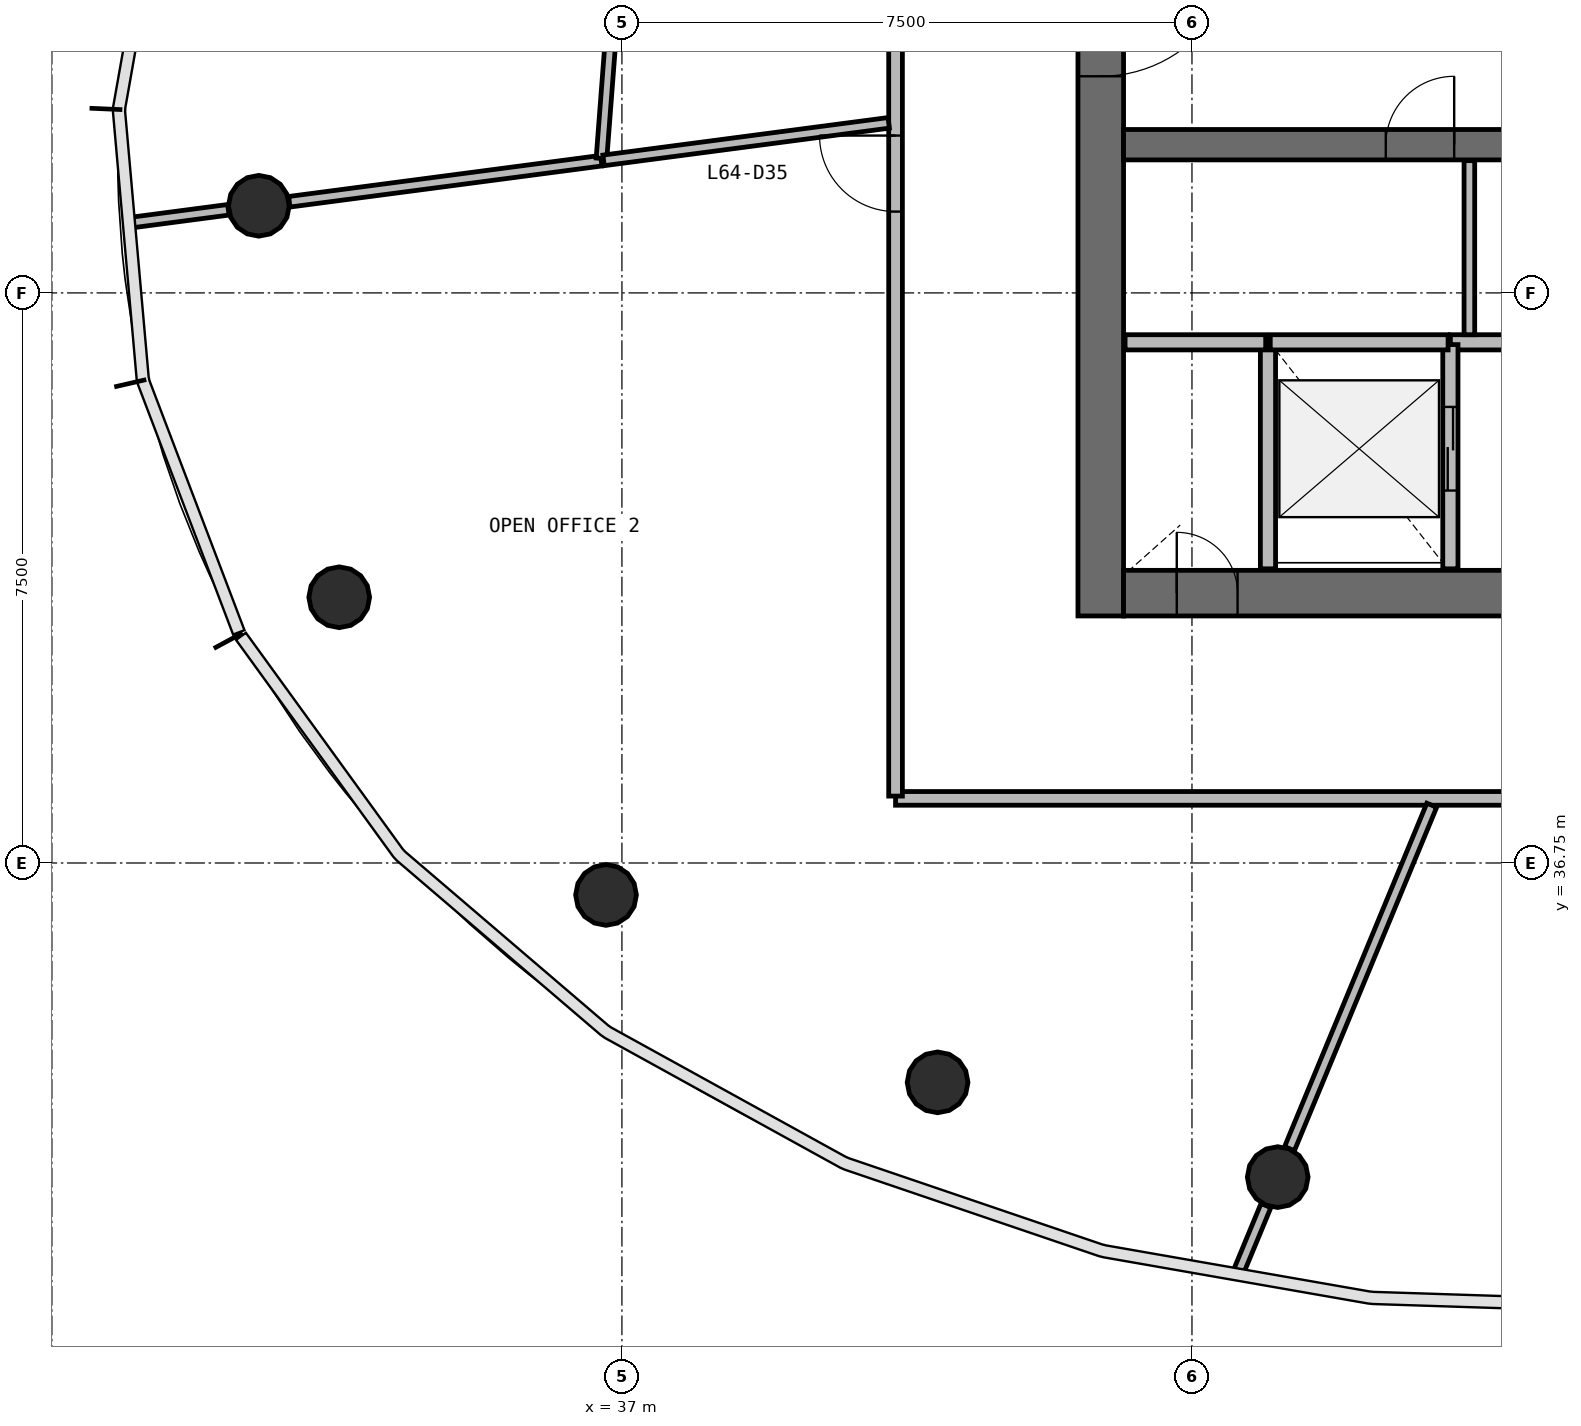
"""IFC4 building model, lengths in metres.
Left out: names, types, materials, properties, quantities, classifications, styles, units other than length and angle.
Written with IfcOpenShell. Run it as: python <this file> out.ifc"""

import sys

from ifc_helpers import new_model, si_unit, direction, frame, frame_2d, origin, origin_2d, place, context, subcontext, project, spatial, rectangle, circle, extrude, source, transform, mapped, element, fill, save


model = new_model("IFC4")
c1 = context("Model", 3, precision=1e-05, world=origin(), true_north=direction((0.0, 1.0)))
c2 = subcontext(c1, "Body", "Model", "MODEL_VIEW")
j1 = project(units=[si_unit("LENGTHUNIT", "METRE"), si_unit("PLANEANGLEUNIT", "RADIAN")], contexts=[c1])
p1 = place(None, origin())
s1 = spatial("IfcSite", under=j1, at=p1, CompositionType="ELEMENT")
p2 = place(p1, origin())
s2 = spatial("IfcBuilding", under=s1, at=p2, CompositionType="ELEMENT")
p3 = place(p2, frame((0.0, 0.0, 261.8)))
s3 = spatial("IfcBuildingStorey", under=s2, at=p3, CompositionType="ELEMENT", Elevation=261.8)
p4 = place(p3, frame((43.3, 56.0, 0.0), z_axis=(0.0, 0.0, 1.0), x_axis=(0.0, -1.0, 0.0)))
e1 = element("IfcWall", 1, at=p4, inside=s3, PredefinedType="SHEAR", context=c2, shape_type="SweptSolid", body=[
    extrude(rectangle(XDim=16.0, YDim=0.6, at=frame_2d((8.0, 0.0))), origin(), (0.0, 0.0, 1.0), 3.9),
])
p5 = place(p4, frame((7.1, 0.0, 0.0)))
e2 = element("IfcOpeningElement", 2, at=p5, cuts=e1, PredefinedType="OPENING", context=c2, shape_type="SweptSolid", body=[
    extrude(rectangle(XDim=1.8, YDim=2.1, at=frame_2d((0.9, 1.05))), frame((0.0, 0.31, 0.0), z_axis=(0.0, -1.0, 0.0), x_axis=(1.0, 0.0, 0.0)), (0.0, 0.0, 1.0), 0.62),
])
p6 = place(p3, frame((43.6, 40.3, 0.0), z_axis=(0.0, 0.0, 1.0), x_axis=(1.0, 0.0, 0.0)))
e3 = element("IfcWall", 3, at=p6, inside=s3, PredefinedType="SHEAR", context=c2, shape_type="SweptSolid", body=[
    extrude(rectangle(XDim=16.8, YDim=0.6, at=frame_2d((8.4, 0.0))), origin(), (0.0, 0.0, 1.0), 3.9),
])
p7 = place(p6, frame((10.3, 0.0, 0.0)))
e4 = element("IfcOpeningElement", 4, at=p7, cuts=e3, PredefinedType="OPENING", context=c2, shape_type="SweptSolid", body=[
    extrude(rectangle(XDim=1.2, YDim=2.1, at=frame_2d((0.6, 1.05))), frame((0.0, 0.31, 0.0), z_axis=(0.0, -1.0, 0.0), x_axis=(1.0, 0.0, 0.0)), (0.0, 0.0, 1.0), 0.62),
])
p8 = place(p6, frame((7.25, 0.0, 0.0)))
e5 = element("IfcOpeningElement", 5, at=p8, cuts=e3, PredefinedType="OPENING", context=c2, shape_type="SweptSolid", body=[
    extrude(rectangle(XDim=1.1, YDim=2.1, at=frame_2d((0.55, 1.05))), frame((0.0, 0.31, 0.0), z_axis=(0.0, -1.0, 0.0), x_axis=(1.0, 0.0, 0.0)), (0.0, 0.0, 1.0), 0.62),
])
p9 = place(p6, frame((0.7, 0.0, 0.0)))
e6 = element("IfcOpeningElement", 6, at=p9, cuts=e3, PredefinedType="OPENING", context=c2, shape_type="SweptSolid", body=[
    extrude(rectangle(XDim=0.8, YDim=2.1, at=frame_2d((0.4, 1.05))), frame((0.0, 0.31, 0.0), z_axis=(0.0, -1.0, 0.0), x_axis=(1.0, 0.0, 0.0)), (0.0, 0.0, 1.0), 0.62),
])
p10 = place(p3, frame((43.6, 46.2, 0.0), z_axis=(0.0, 0.0, 1.0), x_axis=(1.0, 0.0, 0.0)))
e7 = element("IfcWall", 7, at=p10, inside=s3, PredefinedType="SHEAR", context=c2, shape_type="SweptSolid", body=[
    extrude(rectangle(XDim=16.8, YDim=0.4, at=frame_2d((8.4, 0.0))), origin(), (0.0, 0.0, 1.0), 3.9),
])
p11 = place(p10, frame((9.8, 0.0, 0.0)))
e8 = element("IfcOpeningElement", 8, at=p11, cuts=e7, PredefinedType="OPENING", context=c2, shape_type="SweptSolid", body=[
    extrude(rectangle(XDim=1.1, YDim=2.1, at=frame_2d((0.55, 1.05))), frame((0.0, 0.21, 0.0), z_axis=(0.0, -1.0, 0.0), x_axis=(1.0, 0.0, 0.0)), (0.0, 0.0, 1.0), 0.42),
])
p12 = place(p10, frame((12.3, 0.0, 0.0)))
e9 = element("IfcOpeningElement", 9, at=p12, cuts=e7, PredefinedType="OPENING", context=c2, shape_type="SweptSolid", body=[
    extrude(rectangle(XDim=1.1, YDim=2.1, at=frame_2d((0.55, 1.05))), frame((0.0, 0.21, 0.0), z_axis=(0.0, -1.0, 0.0), x_axis=(1.0, 0.0, 0.0)), (0.0, 0.0, 1.0), 0.42),
])
p13 = place(p10, frame((14.8, 0.0, 0.0)))
e10 = element("IfcOpeningElement", 10, at=p13, cuts=e7, PredefinedType="OPENING", context=c2, shape_type="SweptSolid", body=[
    extrude(rectangle(XDim=1.1, YDim=2.1, at=frame_2d((0.55, 1.05))), frame((0.0, 0.21, 0.0), z_axis=(0.0, -1.0, 0.0), x_axis=(1.0, 0.0, 0.0)), (0.0, 0.0, 1.0), 0.42),
])
p14 = place(p10, frame((3.45, 0.0, 0.0)))
e11 = element("IfcOpeningElement", 11, at=p14, cuts=e7, PredefinedType="OPENING", context=c2, shape_type="SweptSolid", body=[
    extrude(rectangle(XDim=0.9, YDim=2.1, at=frame_2d((0.45, 1.05))), frame((0.0, 0.21, 0.0), z_axis=(0.0, -1.0, 0.0), x_axis=(1.0, 0.0, 0.0)), (0.0, 0.0, 1.0), 0.42),
])
p15 = place(p10, frame((7.85, 0.0, 0.0)))
e12 = element("IfcOpeningElement", 12, at=p15, cuts=e7, PredefinedType="OPENING", context=c2, shape_type="SweptSolid", body=[
    extrude(rectangle(XDim=0.9, YDim=2.1, at=frame_2d((0.45, 1.05))), frame((0.0, 0.21, 0.0), z_axis=(0.0, -1.0, 0.0), x_axis=(1.0, 0.0, 0.0)), (0.0, 0.0, 1.0), 0.42),
])
m1 = source(origin(), c2, "Body", "SweptSolid", [
    extrude(circle(Radius=0.4, at=origin_2d()), origin(), (0.0, 0.0, 1.0), 3.9),
])
for number, where, z_axis, x_axis in (
    (13, (32.223, 45.396, 0.0), (0.0, 0.0, 1.0), (1.0, 0.0, 0.0)),
    (14, (33.281, 40.246, 0.0), (0.0, 0.0, 1.0), (1.0, 0.0, 0.0)),
    (15, (36.791, 36.329, 0.0), (0.0, 0.0, 1.0), (1.0, 0.0, 0.0)),
    (16, (41.153, 33.864, 0.0), (0.0, 0.0, 1.0), (1.0, 0.0, 0.0)),
    (17, (45.628, 32.617, 0.0), (0.0, 0.0, 1.0), (1.0, 0.0, 0.0)),
):
    element("IfcColumn", number, at=place(p3, frame(where, z_axis=z_axis, x_axis=x_axis)), inside=s3, PredefinedType="COLUMN", context=c2, shape_type="MappedRepresentation", body=[
        mapped(m1, transform((0.0, 0.0, 0.0), scale=1.0)),
    ])
p16 = place(p3, frame((52.7, 43.6, 0.0), z_axis=(0.0, 0.0, 1.0), x_axis=(-1.0, 0.0, 0.0)))
e18 = element("IfcWall", 18, at=p16, inside=s3, PredefinedType="SOLIDWALL", context=c2, shape_type="SweptSolid", body=[
    extrude(rectangle(XDim=4.8, YDim=0.2, at=frame_2d((2.4, 0.0))), origin(), (0.0, 0.0, 1.0), 3.45),
])
p17 = place(p3, frame((45.5, 43.6, 0.0), z_axis=(0.0, 0.0, 1.0), x_axis=(0.0, -1.0, 0.0)))
e19 = element("IfcWall", 19, at=p17, inside=s3, PredefinedType="SOLIDWALL", context=c2, shape_type="SweptSolid", body=[
    extrude(rectangle(XDim=2.98, YDim=0.2, at=frame_2d((1.49, 0.0))), origin(), (0.0, 0.0, 1.0), 3.45),
])
p18 = place(p3, frame((47.9, 40.62, 0.0), z_axis=(0.0, 0.0, 1.0), x_axis=(0.0, 1.0, 0.0)))
e20 = element("IfcWall", 20, at=p18, inside=s3, PredefinedType="SOLIDWALL", context=c2, shape_type="SweptSolid", body=[
    extrude(rectangle(XDim=2.95, YDim=0.2, at=frame_2d((1.475, 0.0))), origin(), (0.0, 0.0, 1.0), 3.45),
])
p19 = place(p18, frame((1.03, 0.0, 0.0)))
e21 = element("IfcOpeningElement", 21, at=p19, cuts=e20, PredefinedType="OPENING", context=c2, shape_type="SweptSolid", body=[
    extrude(rectangle(XDim=1.1, YDim=2.1, at=frame_2d((0.55, 1.05))), frame((0.0, 0.11, 0.0), z_axis=(0.0, -1.0, 0.0), x_axis=(1.0, 0.0, 0.0)), (0.0, 0.0, 1.0), 0.22),
])
p20 = place(p3, frame((47.87, 43.6, 0.0), z_axis=(0.0, 0.0, 1.0), x_axis=(-1.0, 0.0, 0.0)))
e22 = element("IfcWall", 22, at=p20, inside=s3, PredefinedType="SOLIDWALL", context=c2, shape_type="SweptSolid", body=[
    extrude(rectangle(XDim=2.34, YDim=0.2, at=frame_2d((1.17, 0.0))), origin(), (0.0, 0.0, 1.0), 3.45),
])
p21 = place(p3, frame((45.47, 43.6, 0.0), z_axis=(0.0, 0.0, 1.0), x_axis=(-1.0, 0.0, 0.0)))
e23 = element("IfcWall", 23, at=p21, inside=s3, PredefinedType="SOLIDWALL", context=c2, shape_type="SweptSolid", body=[
    extrude(rectangle(XDim=1.85, YDim=0.2, at=frame_2d((0.925, 0.0))), origin(), (0.0, 0.0, 1.0), 3.45),
])
p22 = place(p3, frame((63.4, 37.6, 0.0), z_axis=(0.0, 0.0, 1.0), x_axis=(-1.0, 0.0, 0.0)))
e24 = element("IfcWall", 24, at=p22, inside=s3, PredefinedType="PARTITIONING", context=c2, shape_type="SweptSolid", body=[
    extrude(rectangle(XDim=22.8, YDim=0.18, at=frame_2d((11.4, 0.0))), origin(), (0.0, 0.0, 1.0), 2.75),
])
p23 = place(p22, frame((10.95, 0.0, 0.0)))
e25 = element("IfcOpeningElement", 25, at=p23, cuts=e24, PredefinedType="OPENING", context=c2, shape_type="SweptSolid", body=[
    extrude(rectangle(XDim=1.0, YDim=2.1, at=frame_2d((0.5, 1.05))), frame((0.0, 0.1, 0.0), z_axis=(0.0, -1.0, 0.0), x_axis=(1.0, 0.0, 0.0)), (0.0, 0.0, 1.0), 0.2),
])
p24 = place(p3, frame((40.6, 37.63, 0.0), z_axis=(0.0, 0.0, 1.0), x_axis=(0.0, 1.0, 0.0)))
e26 = element("IfcWall", 26, at=p24, inside=s3, PredefinedType="PARTITIONING", context=c2, shape_type="SweptSolid", body=[
    extrude(rectangle(XDim=20.74, YDim=0.18, at=frame_2d((10.37, 0.0))), origin(), (0.0, 0.0, 1.0), 2.75),
])
p25 = place(p24, frame((15.49, 0.0, 0.0)))
e27 = element("IfcOpeningElement", 27, at=p25, cuts=e26, PredefinedType="OPENING", context=c2, shape_type="SweptSolid", body=[
    extrude(rectangle(XDim=1.0, YDim=2.1, at=frame_2d((0.5, 1.05))), frame((0.0, 0.1, 0.0), z_axis=(0.0, -1.0, 0.0), x_axis=(1.0, 0.0, 0.0)), (0.0, 0.0, 1.0), 0.2),
])
p26 = place(p24, frame((9.89, 0.0, 0.0)))
e28 = element("IfcOpeningElement", 28, at=p26, cuts=e26, PredefinedType="OPENING", context=c2, shape_type="SweptSolid", body=[
    extrude(rectangle(XDim=1.0, YDim=2.1, at=frame_2d((0.5, 1.05))), frame((0.0, 0.1, 0.0), z_axis=(0.0, -1.0, 0.0), x_axis=(1.0, 0.0, 0.0)), (0.0, 0.0, 1.0), 0.2),
])
p27 = place(p24, frame((7.69, 0.0, 0.0)))
e29 = element("IfcOpeningElement", 29, at=p27, cuts=e26, PredefinedType="OPENING", context=c2, shape_type="SweptSolid", body=[
    extrude(rectangle(XDim=1.0, YDim=2.1, at=frame_2d((0.5, 1.05))), frame((0.0, 0.1, 0.0), z_axis=(0.0, -1.0, 0.0), x_axis=(1.0, 0.0, 0.0)), (0.0, 0.0, 1.0), 0.2),
])
p28 = place(p3, frame((47.655, 37.51, 0.0), z_axis=(0.0, 0.0, 1.0), x_axis=(-0.382689806821, -0.923876892099, 0.0)))
e30 = element("IfcWall", 30, at=p28, inside=s3, PredefinedType="PARTITIONING", context=c2, shape_type="SweptSolid", body=[
    extrude(rectangle(XDim=4.891, YDim=0.14, at=frame_2d((2.445, 0.0))), origin(), (0.0, 0.0, 1.0), 2.75),
])
p29 = place(p3, frame((36.729, 45.99, 0.0), z_axis=(0.0, 0.0, 1.0), x_axis=(-0.991449478062, -0.130491120195, 0.0)))
e31 = element("IfcWall", 31, at=p29, inside=s3, PredefinedType="PARTITIONING", context=c2, shape_type="SweptSolid", body=[
    extrude(rectangle(XDim=4.14, YDim=0.14, at=frame_2d((2.07, 0.0))), origin(), (0.0, 0.0, 1.0), 2.75),
])
p30 = place(p3, frame((36.731, 46.019, 0.0), z_axis=(0.0, 0.0, 1.0), x_axis=(0.07621122266, 0.997091695653, 0.0)))
e32 = element("IfcWall", 32, at=p30, inside=s3, PredefinedType="PARTITIONING", context=c2, shape_type="SweptSolid", body=[
    extrude(rectangle(XDim=3.963, YDim=0.14, at=frame_2d((1.981, 0.0))), origin(), (0.0, 0.0, 1.0), 2.75),
])
p31 = place(p30, frame((1.513, 0.0, 0.0)))
e33 = element("IfcOpeningElement", 33, at=p31, cuts=e32, PredefinedType="OPENING", context=c2, shape_type="SweptSolid", body=[
    extrude(rectangle(XDim=1.0, YDim=2.1, at=frame_2d((0.5, 1.05))), frame((0.0, 0.08, 0.0), z_axis=(0.0, -1.0, 0.0), x_axis=(1.0, 0.0, 0.0)), (0.0, 0.0, 1.0), 0.16),
])
p32 = place(p3, frame((40.51, 46.487, 0.0), z_axis=(0.0, 0.0, 1.0), x_axis=(-0.99144572909, -0.13051960109, 0.0)))
e34 = element("IfcWall", 34, at=p32, inside=s3, PredefinedType="PARTITIONING", context=c2, shape_type="SweptSolid", body=[
    extrude(rectangle(XDim=3.784, YDim=0.14, at=frame_2d((1.892, 0.0))), origin(), (0.0, 0.0, 1.0), 2.75),
])
p33 = place(p3, frame((48.15, 43.7, 0.0), z_axis=(0.0, 0.0, 1.0), x_axis=(0.0, 1.0, 0.0)))
e35 = element("IfcWall", 35, at=p33, inside=s3, PredefinedType="PARTITIONING", context=c2, shape_type="SweptSolid", body=[
    extrude(rectangle(XDim=2.29, YDim=0.14, at=frame_2d((1.145, 0.0))), origin(), (0.0, 0.0, 1.0), 2.75),
])
p34 = place(p3, frame((31.822, 45.344, 0.0), z_axis=(0.0, 0.0, 1.0), x_axis=(-0.991448038251, -0.130502059169, 0.0)))
e36 = element("IfcWall", 36, at=p34, inside=s3, PredefinedType="PARTITIONING", context=c2, shape_type="SweptSolid", body=[
    extrude(rectangle(XDim=1.328, YDim=0.14, at=frame_2d((0.664, 0.0))), origin(), (0.0, 0.0, 1.0), 2.75),
])
p35 = place(p3, frame((45.473, 32.243, 0.0), z_axis=(0.0, 0.0, 1.0), x_axis=(-0.382781658682, -0.923838839721, 0.0)))
e37 = element("IfcWall", 37, at=p35, inside=s3, PredefinedType="PARTITIONING", context=c2, shape_type="SweptSolid", body=[
    extrude(rectangle(XDim=0.936, YDim=0.14, at=frame_2d((0.468, 0.0))), origin(), (0.0, 0.0, 1.0), 2.75),
])
m2 = source(origin(), c2, "Body", "SweptSolid", [
    extrude(rectangle(XDim=1.8, YDim=2.1, at=frame_2d((0.9, 1.05))), frame((0.0, 0.025, 0.0), z_axis=(0.0, -1.0, 0.0), x_axis=(1.0, 0.0, 0.0)), (0.0, 0.0, 1.0), 0.05),
])
p36 = place(p5, origin())
e38 = element("IfcDoor", 38, at=p36, inside=s3, OperationType="SINGLE_SWING_LEFT", PredefinedType="DOOR", context=c2, shape_type="MappedRepresentation", body=[
    mapped(m2, transform((0.0, 0.0, 0.0), scale=1.0)),
])
fill(e2, e38)
m3 = source(origin(), c2, "Body", "SweptSolid", [
    extrude(rectangle(XDim=1.1, YDim=2.1, at=frame_2d((0.55, 1.05))), frame((0.0, 0.025, 0.0), z_axis=(0.0, -1.0, 0.0), x_axis=(1.0, 0.0, 0.0)), (0.0, 0.0, 1.0), 0.05),
])
p37 = place(p19, origin())
e39 = element("IfcDoor", 39, at=p37, inside=s3, OperationType="DOUBLE_DOOR_SLIDING", PredefinedType="USERDEFINED", context=c2, shape_type="MappedRepresentation", body=[
    mapped(m3, transform((0.0, 0.0, 0.0), scale=1.0)),
])
fill(e21, e39)
m4 = source(origin(), c2, "Body", "SweptSolid", [
    extrude(rectangle(XDim=0.8, YDim=2.1, at=frame_2d((0.4, 1.05))), frame((0.0, 0.025, 0.0), z_axis=(0.0, -1.0, 0.0), x_axis=(1.0, 0.0, 0.0)), (0.0, 0.0, 1.0), 0.05),
])
p38 = place(p9, origin())
e40 = element("IfcDoor", 40, at=p38, inside=s3, OperationType="SINGLE_SWING_LEFT", PredefinedType="DOOR", context=c2, shape_type="MappedRepresentation", body=[
    mapped(m4, transform((0.0, 0.0, 0.0), scale=1.0)),
])
fill(e6, e40)
m5 = source(origin(), c2, "Body", "SweptSolid", [
    extrude(rectangle(XDim=1.0, YDim=2.1, at=frame_2d((0.5, 1.05))), frame((0.0, 0.025, 0.0), z_axis=(0.0, -1.0, 0.0), x_axis=(1.0, 0.0, 0.0)), (0.0, 0.0, 1.0), 0.05),
])
p39 = place(p27, origin())
e41 = element("IfcDoor", 41, at=p39, inside=s3, OperationType="SINGLE_SWING_RIGHT", PredefinedType="DOOR", context=c2, shape_type="MappedRepresentation", body=[
    mapped(m5, transform((0.0, 0.0, 0.0), scale=1.0)),
])
fill(e29, e41)
m6 = source(origin(), c2, "Body", "SweptSolid", [
    extrude(rectangle(XDim=0.9, YDim=2.1, at=frame_2d((0.45, 1.05))), frame((0.0, 0.025, 0.0), z_axis=(0.0, -1.0, 0.0), x_axis=(1.0, 0.0, 0.0)), (0.0, 0.0, 1.0), 0.05),
])
p40 = place(p14, origin())
e42 = element("IfcDoor", 42, at=p40, inside=s3, OperationType="SINGLE_SWING_RIGHT", PredefinedType="DOOR", context=c2, shape_type="MappedRepresentation", body=[
    mapped(m6, transform((0.0, 0.0, 0.0), scale=1.0)),
])
fill(e11, e42)
save(model, sys.argv[1])
